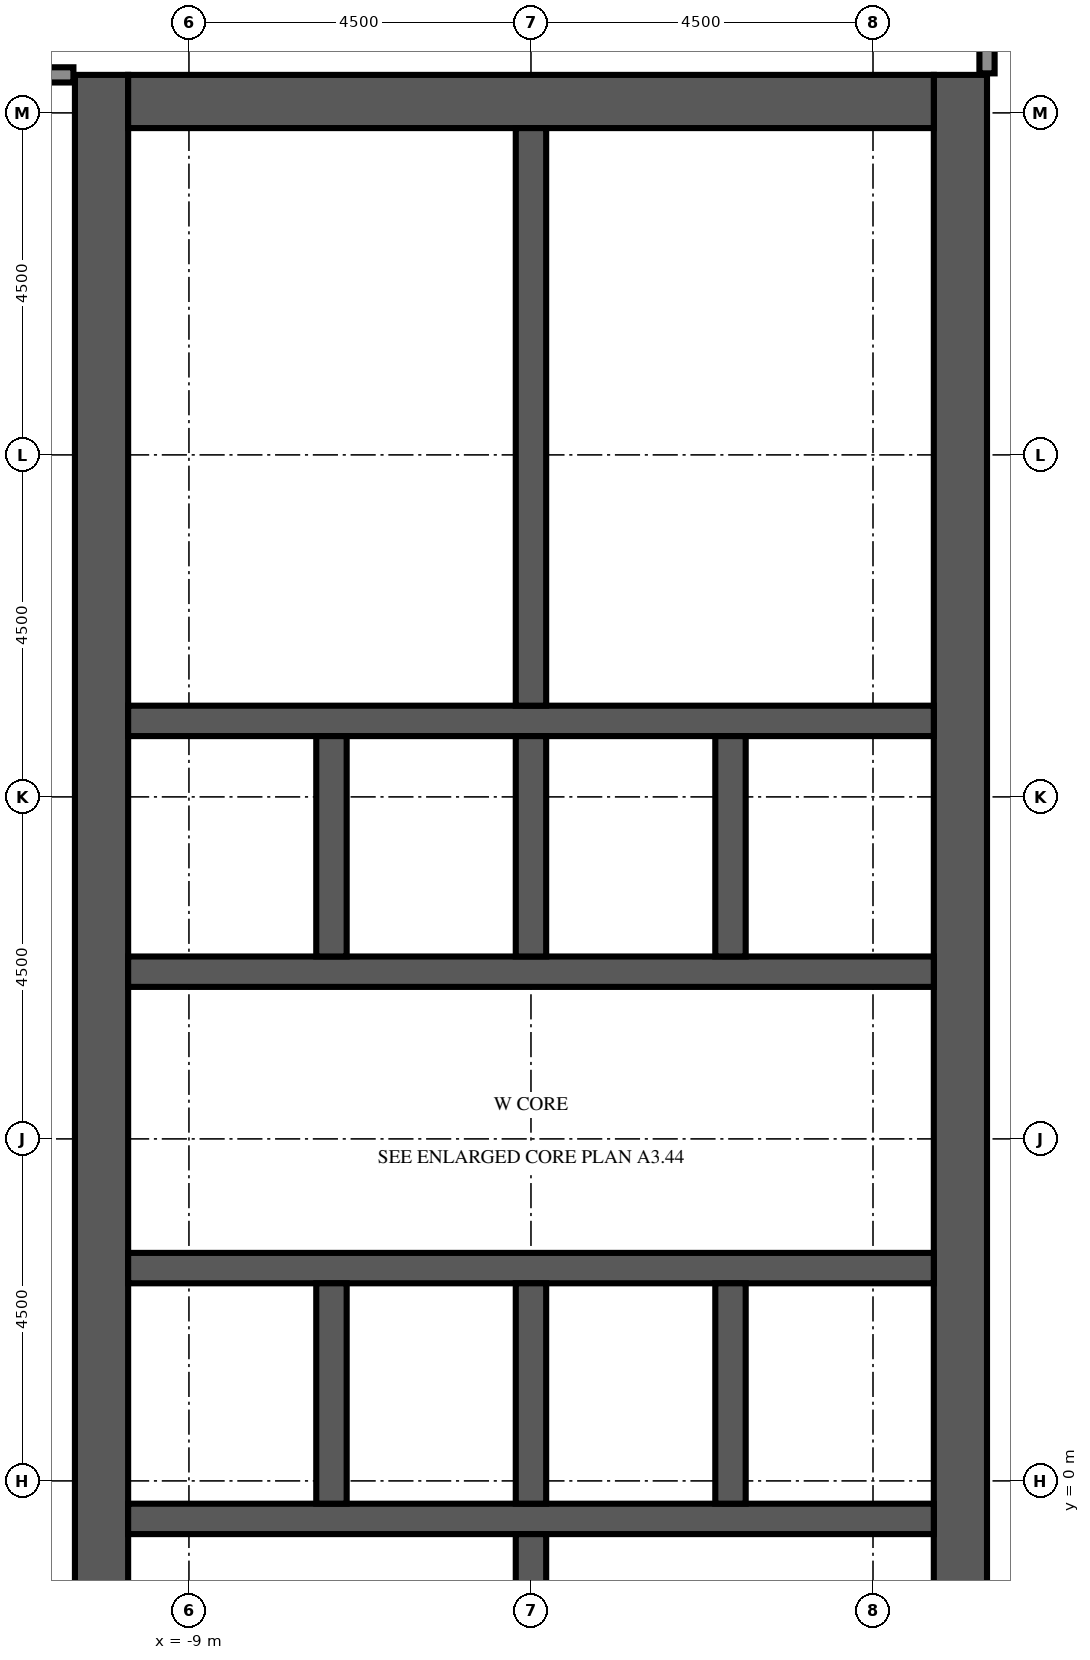
"""IFC4 building model, lengths in metres.
Left out: names, types, materials, properties, quantities, classifications, styles, units other than length and angle.
Written with IfcOpenShell. Run it as: python <this file> out.ifc"""

import sys

from ifc_helpers import new_model, si_unit, direction, frame, frame_2d, origin, place, context, subcontext, project, spatial, rectangle, extrude, element, fill, save


model = new_model("IFC4")
c1 = context("Model", 3, precision=1e-05, world=origin(), true_north=direction((0.0, 1.0)))
c2 = subcontext(c1, "Body", "Model", "MODEL_VIEW")
j1 = project(units=[si_unit("LENGTHUNIT", "METRE"), si_unit("PLANEANGLEUNIT", "RADIAN")], contexts=[c1])
p1 = place(None, origin())
s1 = spatial("IfcSite", under=j1, at=p1, CompositionType="ELEMENT")
p2 = place(p1, origin())
s2 = spatial("IfcBuilding", under=s1, at=p2, CompositionType="ELEMENT")
p3 = place(p2, frame((0.0, 0.0, 306.4)))
s3 = spatial("IfcBuildingStorey", under=s2, at=p3, CompositionType="ELEMENT", Elevation=306.4)
p4 = place(p3, frame((-10.15, -9.0, 0.0), z_axis=(0.0, 0.0, 1.0), x_axis=(0.0, 1.0, 0.0)))
e1 = element("IfcWall", 1, at=p4, inside=s3, PredefinedType="SHEAR", context=c2, shape_type="SweptSolid", body=[
    extrude(rectangle(XDim=27.5, YDim=0.7, at=frame_2d((13.75, 0.0))), origin(), (0.0, 0.0, 1.0), 5.4),
])
p5 = place(p4, frame((12.55, 0.0, 0.0)))
e2 = element("IfcOpeningElement", 2, at=p5, cuts=e1, PredefinedType="OPENING", context=c2, shape_type="SweptSolid", body=[
    extrude(rectangle(XDim=2.4, YDim=2.4, at=frame_2d((1.2, 1.2))), frame((0.0, 0.36, 0.0), z_axis=(0.0, -1.0, 0.0), x_axis=(1.0, 0.0, 0.0)), (0.0, 0.0, 1.0), 0.72),
])
p6 = place(p4, frame((6.825, 0.0, 0.0)))
e3 = element("IfcOpeningElement", 3, at=p6, cuts=e1, PredefinedType="OPENING", context=c2, shape_type="SweptSolid", body=[
    extrude(rectangle(XDim=1.2, YDim=2.1, at=frame_2d((0.6, 1.05))), frame((0.0, 0.36, 0.0), z_axis=(0.0, -1.0, 0.0), x_axis=(1.0, 0.0, 0.0)), (0.0, 0.0, 1.0), 0.72),
])
p7 = place(p4, frame((19.475, 0.0, 0.0)))
e4 = element("IfcOpeningElement", 4, at=p7, cuts=e1, PredefinedType="OPENING", context=c2, shape_type="SweptSolid", body=[
    extrude(rectangle(XDim=1.2, YDim=2.1, at=frame_2d((0.6, 1.05))), frame((0.0, 0.36, 0.0), z_axis=(0.0, -1.0, 0.0), x_axis=(1.0, 0.0, 0.0)), (0.0, 0.0, 1.0), 0.72),
])
p8 = place(p3, frame((1.15, -9.0, 0.0), z_axis=(0.0, 0.0, 1.0), x_axis=(0.0, 1.0, 0.0)))
e5 = element("IfcWall", 5, at=p8, inside=s3, PredefinedType="SHEAR", context=c2, shape_type="SweptSolid", body=[
    extrude(rectangle(XDim=27.5, YDim=0.7, at=frame_2d((13.75, 0.0))), origin(), (0.0, 0.0, 1.0), 5.4),
])
p9 = place(p8, frame((12.55, 0.0, 0.0)))
e6 = element("IfcOpeningElement", 6, at=p9, cuts=e5, PredefinedType="OPENING", context=c2, shape_type="SweptSolid", body=[
    extrude(rectangle(XDim=2.4, YDim=2.4, at=frame_2d((1.2, 1.2))), frame((0.0, 0.36, 0.0), z_axis=(0.0, -1.0, 0.0), x_axis=(1.0, 0.0, 0.0)), (0.0, 0.0, 1.0), 0.72),
])
p10 = place(p8, frame((5.46, 0.0, 0.0)))
e7 = element("IfcOpeningElement", 7, at=p10, cuts=e5, PredefinedType="OPENING", context=c2, shape_type="SweptSolid", body=[
    extrude(rectangle(XDim=0.968, YDim=2.1, at=frame_2d((0.484, 1.05))), frame((0.0, 0.36, 0.0), z_axis=(0.0, -1.0, 0.0), x_axis=(1.0, 0.0, 0.0)), (0.0, 0.0, 1.0), 0.72),
])
p11 = place(p8, frame((23.54, 0.0, 0.0)))
e8 = element("IfcOpeningElement", 8, at=p11, cuts=e5, PredefinedType="OPENING", context=c2, shape_type="SweptSolid", body=[
    extrude(rectangle(XDim=1.2, YDim=2.1, at=frame_2d((0.6, 1.05))), frame((0.0, 0.36, 0.0), z_axis=(0.0, -1.0, 0.0), x_axis=(1.0, 0.0, 0.0)), (0.0, 0.0, 1.0), 0.72),
])
p12 = place(p3, frame((-9.8, 18.15, 0.0), z_axis=(0.0, 0.0, 1.0), x_axis=(1.0, 0.0, 0.0)))
e9 = element("IfcWall", 9, at=p12, inside=s3, PredefinedType="SHEAR", context=c2, shape_type="SweptSolid", body=[
    extrude(rectangle(XDim=10.6, YDim=0.7, at=frame_2d((5.3, 0.0))), origin(), (0.0, 0.0, 1.0), 5.4),
])
p13 = place(p3, frame((-9.8, -0.5, 0.0), z_axis=(0.0, 0.0, 1.0), x_axis=(1.0, 0.0, 0.0)))
e10 = element("IfcWall", 10, at=p13, inside=s3, PredefinedType="SHEAR", context=c2, shape_type="SweptSolid", body=[
    extrude(rectangle(XDim=10.6, YDim=0.4, at=frame_2d((5.3, 0.0))), origin(), (0.0, 0.0, 1.0), 5.4),
])
p14 = place(p3, frame((-9.8, 2.8, 0.0), z_axis=(0.0, 0.0, 1.0), x_axis=(1.0, 0.0, 0.0)))
e11 = element("IfcWall", 11, at=p14, inside=s3, PredefinedType="SHEAR", context=c2, shape_type="SweptSolid", body=[
    extrude(rectangle(XDim=10.6, YDim=0.4, at=frame_2d((5.3, 0.0))), origin(), (0.0, 0.0, 1.0), 5.4),
])
p15 = place(p14, frame((0.688, 0.0, 0.0)))
e12 = element("IfcOpeningElement", 12, at=p15, cuts=e11, PredefinedType="OPENING", context=c2, shape_type="SweptSolid", body=[
    extrude(rectangle(XDim=1.1, YDim=2.1, at=frame_2d((0.55, 1.05))), frame((0.0, 0.21, 0.0), z_axis=(0.0, -1.0, 0.0), x_axis=(1.0, 0.0, 0.0)), (0.0, 0.0, 1.0), 0.42),
])
p16 = place(p14, frame((3.438, 0.0, 0.0)))
e13 = element("IfcOpeningElement", 13, at=p16, cuts=e11, PredefinedType="OPENING", context=c2, shape_type="SweptSolid", body=[
    extrude(rectangle(XDim=1.1, YDim=2.1, at=frame_2d((0.55, 1.05))), frame((0.0, 0.21, 0.0), z_axis=(0.0, -1.0, 0.0), x_axis=(1.0, 0.0, 0.0)), (0.0, 0.0, 1.0), 0.42),
])
p17 = place(p14, frame((6.113, 0.0, 0.0)))
e14 = element("IfcOpeningElement", 14, at=p17, cuts=e11, PredefinedType="OPENING", context=c2, shape_type="SweptSolid", body=[
    extrude(rectangle(XDim=1.0, YDim=2.1, at=frame_2d((0.5, 1.05))), frame((0.0, 0.21, 0.0), z_axis=(0.0, -1.0, 0.0), x_axis=(1.0, 0.0, 0.0)), (0.0, 0.0, 1.0), 0.42),
])
p18 = place(p14, frame((8.863, 0.0, 0.0)))
e15 = element("IfcOpeningElement", 15, at=p18, cuts=e11, PredefinedType="OPENING", context=c2, shape_type="SweptSolid", body=[
    extrude(rectangle(XDim=1.0, YDim=2.1, at=frame_2d((0.5, 1.05))), frame((0.0, 0.21, 0.0), z_axis=(0.0, -1.0, 0.0), x_axis=(1.0, 0.0, 0.0)), (0.0, 0.0, 1.0), 0.42),
])
p19 = place(p3, frame((-9.8, 6.7, 0.0), z_axis=(0.0, 0.0, 1.0), x_axis=(1.0, 0.0, 0.0)))
e16 = element("IfcWall", 16, at=p19, inside=s3, PredefinedType="SHEAR", context=c2, shape_type="SweptSolid", body=[
    extrude(rectangle(XDim=10.6, YDim=0.4, at=frame_2d((5.3, 0.0))), origin(), (0.0, 0.0, 1.0), 5.4),
])
p20 = place(p19, frame((0.738, 0.0, 0.0)))
e17 = element("IfcOpeningElement", 17, at=p20, cuts=e16, PredefinedType="OPENING", context=c2, shape_type="SweptSolid", body=[
    extrude(rectangle(XDim=1.0, YDim=2.1, at=frame_2d((0.5, 1.05))), frame((0.0, 0.21, 0.0), z_axis=(0.0, -1.0, 0.0), x_axis=(1.0, 0.0, 0.0)), (0.0, 0.0, 1.0), 0.42),
])
p21 = place(p19, frame((3.488, 0.0, 0.0)))
e18 = element("IfcOpeningElement", 18, at=p21, cuts=e16, PredefinedType="OPENING", context=c2, shape_type="SweptSolid", body=[
    extrude(rectangle(XDim=1.0, YDim=2.1, at=frame_2d((0.5, 1.05))), frame((0.0, 0.21, 0.0), z_axis=(0.0, -1.0, 0.0), x_axis=(1.0, 0.0, 0.0)), (0.0, 0.0, 1.0), 0.42),
])
p22 = place(p19, frame((6.113, 0.0, 0.0)))
e19 = element("IfcOpeningElement", 19, at=p22, cuts=e16, PredefinedType="OPENING", context=c2, shape_type="SweptSolid", body=[
    extrude(rectangle(XDim=1.0, YDim=2.1, at=frame_2d((0.5, 1.05))), frame((0.0, 0.21, 0.0), z_axis=(0.0, -1.0, 0.0), x_axis=(1.0, 0.0, 0.0)), (0.0, 0.0, 1.0), 0.42),
])
p23 = place(p19, frame((8.863, 0.0, 0.0)))
e20 = element("IfcOpeningElement", 20, at=p23, cuts=e16, PredefinedType="OPENING", context=c2, shape_type="SweptSolid", body=[
    extrude(rectangle(XDim=1.0, YDim=2.1, at=frame_2d((0.5, 1.05))), frame((0.0, 0.21, 0.0), z_axis=(0.0, -1.0, 0.0), x_axis=(1.0, 0.0, 0.0)), (0.0, 0.0, 1.0), 0.42),
])
p24 = place(p3, frame((-9.8, 10.0, 0.0), z_axis=(0.0, 0.0, 1.0), x_axis=(1.0, 0.0, 0.0)))
e21 = element("IfcWall", 21, at=p24, inside=s3, PredefinedType="SHEAR", context=c2, shape_type="SweptSolid", body=[
    extrude(rectangle(XDim=10.6, YDim=0.4, at=frame_2d((5.3, 0.0))), origin(), (0.0, 0.0, 1.0), 5.4),
])
for number, where, z_axis, x_axis in (
    (22, (-7.125, -0.3, 0.0), (0.0, 0.0, 1.0), (0.0, 1.0, 0.0)),
    (23, (-7.125, 6.9, 0.0), (0.0, 0.0, 1.0), (0.0, 1.0, 0.0)),
    (24, (-4.5, -0.3, 0.0), (0.0, 0.0, 1.0), (0.0, 1.0, 0.0)),
    (25, (-4.5, 6.9, 0.0), (0.0, 0.0, 1.0), (0.0, 1.0, 0.0)),
    (26, (-1.875, -0.3, 0.0), (0.0, 0.0, 1.0), (0.0, 1.0, 0.0)),
    (27, (-1.875, 6.9, 0.0), (0.0, 0.0, 1.0), (0.0, 1.0, 0.0)),
):
    element("IfcWall", number, at=place(p3, frame(where, z_axis=z_axis, x_axis=x_axis)), inside=s3, PredefinedType="SHEAR", context=c2, shape_type="SweptSolid", body=[
        extrude(rectangle(XDim=2.9, YDim=0.4, at=frame_2d((1.45, 0.0))), origin(), (0.0, 0.0, 1.0), 5.4),
    ])
for number, where, z_axis, x_axis in (
    (28, (-4.5, -8.3, 0.0), (0.0, 0.0, 1.0), (0.0, 1.0, 0.0)),
    (29, (-4.5, 10.2, 0.0), (0.0, 0.0, 1.0), (0.0, 1.0, 0.0)),
):
    element("IfcWall", number, at=place(p3, frame(where, z_axis=z_axis, x_axis=x_axis)), inside=s3, PredefinedType="SHEAR", context=c2, shape_type="SweptSolid", body=[
        extrude(rectangle(XDim=7.6, YDim=0.4, at=frame_2d((3.8, 0.0))), origin(), (0.0, 0.0, 1.0), 5.4),
    ])
p25 = place(p3, frame((-13.0, 18.5, 0.0), z_axis=(0.0, 0.0, 1.0), x_axis=(1.0, 0.0, 0.0)))
e30 = element("IfcWall", 30, at=p25, inside=s3, PredefinedType="PARTITIONING", context=c2, shape_type="SweptSolid", body=[
    extrude(rectangle(XDim=2.48, YDim=0.2, at=frame_2d((1.24, 0.0))), origin(), (0.0, 0.0, 1.0), 4.8),
])
p26 = place(p3, frame((1.5, 18.52, 0.0), z_axis=(0.0, 0.0, 1.0), x_axis=(0.0, 1.0, 0.0)))
e31 = element("IfcWall", 31, at=p26, inside=s3, PredefinedType="PARTITIONING", context=c2, shape_type="SweptSolid", body=[
    extrude(rectangle(XDim=3.835, YDim=0.2, at=frame_2d((1.917, 0.0))), origin(), (0.0, 0.0, 1.0), 4.8),
])
p27 = place(p26, frame((1.58, 0.0, 0.0)))
e32 = element("IfcOpeningElement", 32, at=p27, cuts=e31, PredefinedType="OPENING", context=c2, shape_type="SweptSolid", body=[
    extrude(rectangle(XDim=1.0, YDim=2.1, at=frame_2d((0.5, 1.05))), frame((0.0, 0.11, 0.0), z_axis=(0.0, -1.0, 0.0), x_axis=(1.0, 0.0, 0.0)), (0.0, 0.0, 1.0), 0.22),
])
p28 = place(p3, frame((-1.75, -2.372, 0.0), z_axis=(0.0, 0.0, 1.0), x_axis=(0.0, 1.0, 0.0)))
e33 = element("IfcWall", 33, at=p28, inside=s3, PredefinedType="PARTITIONING", context=c2, shape_type="SweptSolid", body=[
    extrude(rectangle(XDim=1.672, YDim=0.1, at=frame_2d((0.836, 0.0))), origin(), (0.0, 0.0, 1.0), 4.8),
])
p29 = place(p3, frame((-0.5, 12.48, 0.0), z_axis=(0.0, 0.0, 1.0), x_axis=(1.0, 0.0, 0.0)))
e34 = element("IfcWall", 34, at=p29, inside=s3, PredefinedType="PARTITIONING", context=c2, shape_type="SweptSolid", body=[
    extrude(rectangle(XDim=1.3, YDim=0.1, at=frame_2d((0.65, 0.0))), origin(), (0.0, 0.0, 1.0), 4.8),
])
p30 = place(p29, frame((0.2, 0.0, 0.0)))
e35 = element("IfcOpeningElement", 35, at=p30, cuts=e34, PredefinedType="OPENING", context=c2, shape_type="SweptSolid", body=[
    extrude(rectangle(XDim=0.9, YDim=2.1, at=frame_2d((0.45, 1.05))), frame((0.0, 0.06, 0.0), z_axis=(0.0, -1.0, 0.0), x_axis=(1.0, 0.0, 0.0)), (0.0, 0.0, 1.0), 0.12),
])
p31 = place(p3, frame((-4.3, 12.48, 0.0), z_axis=(0.0, 0.0, 1.0), x_axis=(1.0, 0.0, 0.0)))
e36 = element("IfcWall", 36, at=p31, inside=s3, PredefinedType="PARTITIONING", context=c2, shape_type="SweptSolid", body=[
    extrude(rectangle(XDim=3.8, YDim=0.1, at=frame_2d((1.9, 0.0))), origin(), (0.0, 0.0, 1.0), 4.8),
])
p32 = place(p3, frame((-0.5, 12.48, 0.0), z_axis=(0.0, 0.0, 1.0), x_axis=(0.0, 1.0, 0.0)))
e37 = element("IfcWall", 37, at=p32, inside=s3, PredefinedType="PARTITIONING", context=c2, shape_type="SweptSolid", body=[
    extrude(rectangle(XDim=2.66, YDim=0.1, at=frame_2d((1.33, 0.0))), origin(), (0.0, 0.0, 1.0), 4.8),
])
p33 = place(p32, frame((0.83, 0.0, 0.0)))
e38 = element("IfcOpeningElement", 38, at=p33, cuts=e37, PredefinedType="OPENING", context=c2, shape_type="SweptSolid", body=[
    extrude(rectangle(XDim=1.0, YDim=2.1, at=frame_2d((0.5, 1.05))), frame((0.0, 0.06, 0.0), z_axis=(0.0, -1.0, 0.0), x_axis=(1.0, 0.0, 0.0)), (0.0, 0.0, 1.0), 0.12),
])
p34 = place(p3, frame((-0.5, 15.14, 0.0), z_axis=(0.0, 0.0, 1.0), x_axis=(0.0, 1.0, 0.0)))
e39 = element("IfcWall", 39, at=p34, inside=s3, PredefinedType="PARTITIONING", context=c2, shape_type="SweptSolid", body=[
    extrude(rectangle(XDim=2.66, YDim=0.1, at=frame_2d((1.33, 0.0))), origin(), (0.0, 0.0, 1.0), 4.8),
])
p35 = place(p34, frame((0.83, 0.0, 0.0)))
e40 = element("IfcOpeningElement", 40, at=p35, cuts=e39, PredefinedType="OPENING", context=c2, shape_type="SweptSolid", body=[
    extrude(rectangle(XDim=1.0, YDim=2.1, at=frame_2d((0.5, 1.05))), frame((0.0, 0.06, 0.0), z_axis=(0.0, -1.0, 0.0), x_axis=(1.0, 0.0, 0.0)), (0.0, 0.0, 1.0), 0.12),
])
p36 = place(p3, frame((-4.3, 15.14, 0.0), z_axis=(0.0, 0.0, 1.0), x_axis=(1.0, 0.0, 0.0)))
e41 = element("IfcWall", 41, at=p36, inside=s3, PredefinedType="PARTITIONING", context=c2, shape_type="SweptSolid", body=[
    extrude(rectangle(XDim=3.8, YDim=0.1, at=frame_2d((1.9, 0.0))), origin(), (0.0, 0.0, 1.0), 4.8),
])
p37 = place(p15, origin())
e42 = element("IfcDoor", 42, at=p37, inside=s3, OperationType="DOUBLE_DOOR_SLIDING", PredefinedType="DOOR", context=c2, shape_type="SweptSolid", body=[
    extrude(rectangle(XDim=1.1, YDim=2.1, at=frame_2d((0.55, 1.05))), frame((0.0, 0.025, 0.0), z_axis=(0.0, -1.0, 0.0), x_axis=(1.0, 0.0, 0.0)), (0.0, 0.0, 1.0), 0.05),
])
fill(e12, e42)
p38 = place(p16, origin())
e43 = element("IfcDoor", 43, at=p38, inside=s3, OperationType="DOUBLE_DOOR_SLIDING", PredefinedType="DOOR", context=c2, shape_type="SweptSolid", body=[
    extrude(rectangle(XDim=1.1, YDim=2.1, at=frame_2d((0.55, 1.05))), frame((0.0, 0.025, 0.0), z_axis=(0.0, -1.0, 0.0), x_axis=(1.0, 0.0, 0.0)), (0.0, 0.0, 1.0), 0.05),
])
fill(e13, e43)
p39 = place(p5, origin())
e44 = element("IfcDoor", 44, at=p39, inside=s3, OperationType="DOUBLE_DOOR_DOUBLE_SWING", PredefinedType="DOOR", context=c2, shape_type="SweptSolid", body=[
    extrude(rectangle(XDim=2.4, YDim=2.4, at=frame_2d((1.2, 1.2))), frame((0.0, 0.025, 0.0), z_axis=(0.0, -1.0, 0.0), x_axis=(1.0, 0.0, 0.0)), (0.0, 0.0, 1.0), 0.05),
])
fill(e2, e44)
p40 = place(p9, origin())
e45 = element("IfcDoor", 45, at=p40, inside=s3, OperationType="DOUBLE_DOOR_DOUBLE_SWING", PredefinedType="DOOR", context=c2, shape_type="SweptSolid", body=[
    extrude(rectangle(XDim=2.4, YDim=2.4, at=frame_2d((1.2, 1.2))), frame((0.0, 0.025, 0.0), z_axis=(0.0, -1.0, 0.0), x_axis=(1.0, 0.0, 0.0)), (0.0, 0.0, 1.0), 0.05),
])
fill(e6, e45)
p41 = place(p6, origin())
e46 = element("IfcDoor", 46, at=p41, inside=s3, OperationType="SINGLE_SWING_LEFT", PredefinedType="DOOR", context=c2, shape_type="SweptSolid", body=[
    extrude(rectangle(XDim=1.2, YDim=2.1, at=frame_2d((0.6, 1.05))), frame((0.0, 0.025, 0.0), z_axis=(0.0, -1.0, 0.0), x_axis=(1.0, 0.0, 0.0)), (0.0, 0.0, 1.0), 0.05),
])
fill(e3, e46)
p42 = place(p7, origin())
e47 = element("IfcDoor", 47, at=p42, inside=s3, OperationType="SINGLE_SWING_LEFT", PredefinedType="DOOR", context=c2, shape_type="SweptSolid", body=[
    extrude(rectangle(XDim=1.2, YDim=2.1, at=frame_2d((0.6, 1.05))), frame((0.0, 0.025, 0.0), z_axis=(0.0, -1.0, 0.0), x_axis=(1.0, 0.0, 0.0)), (0.0, 0.0, 1.0), 0.05),
])
fill(e4, e47)
p43 = place(p17, origin())
e48 = element("IfcDoor", 48, at=p43, inside=s3, OperationType="SINGLE_SWING_LEFT", PredefinedType="DOOR", context=c2, shape_type="SweptSolid", body=[
    extrude(rectangle(XDim=1.0, YDim=2.1, at=frame_2d((0.5, 1.05))), frame((0.0, 0.025, 0.0), z_axis=(0.0, -1.0, 0.0), x_axis=(1.0, 0.0, 0.0)), (0.0, 0.0, 1.0), 0.05),
])
fill(e14, e48)
p44 = place(p18, origin())
e49 = element("IfcDoor", 49, at=p44, inside=s3, OperationType="SINGLE_SWING_RIGHT", PredefinedType="DOOR", context=c2, shape_type="SweptSolid", body=[
    extrude(rectangle(XDim=1.0, YDim=2.1, at=frame_2d((0.5, 1.05))), frame((0.0, 0.025, 0.0), z_axis=(0.0, -1.0, 0.0), x_axis=(1.0, 0.0, 0.0)), (0.0, 0.0, 1.0), 0.05),
])
fill(e15, e49)
p45 = place(p20, origin())
e50 = element("IfcDoor", 50, at=p45, inside=s3, OperationType="SINGLE_SWING_LEFT", PredefinedType="DOOR", context=c2, shape_type="SweptSolid", body=[
    extrude(rectangle(XDim=1.0, YDim=2.1, at=frame_2d((0.5, 1.05))), frame((0.0, 0.025, 0.0), z_axis=(0.0, -1.0, 0.0), x_axis=(1.0, 0.0, 0.0)), (0.0, 0.0, 1.0), 0.05),
])
fill(e17, e50)
p46 = place(p21, origin())
e51 = element("IfcDoor", 51, at=p46, inside=s3, OperationType="SINGLE_SWING_RIGHT", PredefinedType="DOOR", context=c2, shape_type="SweptSolid", body=[
    extrude(rectangle(XDim=1.0, YDim=2.1, at=frame_2d((0.5, 1.05))), frame((0.0, 0.025, 0.0), z_axis=(0.0, -1.0, 0.0), x_axis=(1.0, 0.0, 0.0)), (0.0, 0.0, 1.0), 0.05),
])
fill(e18, e51)
p47 = place(p22, origin())
e52 = element("IfcDoor", 52, at=p47, inside=s3, OperationType="SINGLE_SWING_LEFT", PredefinedType="DOOR", context=c2, shape_type="SweptSolid", body=[
    extrude(rectangle(XDim=1.0, YDim=2.1, at=frame_2d((0.5, 1.05))), frame((0.0, 0.025, 0.0), z_axis=(0.0, -1.0, 0.0), x_axis=(1.0, 0.0, 0.0)), (0.0, 0.0, 1.0), 0.05),
])
fill(e19, e52)
p48 = place(p23, origin())
e53 = element("IfcDoor", 53, at=p48, inside=s3, OperationType="SINGLE_SWING_RIGHT", PredefinedType="DOOR", context=c2, shape_type="SweptSolid", body=[
    extrude(rectangle(XDim=1.0, YDim=2.1, at=frame_2d((0.5, 1.05))), frame((0.0, 0.025, 0.0), z_axis=(0.0, -1.0, 0.0), x_axis=(1.0, 0.0, 0.0)), (0.0, 0.0, 1.0), 0.05),
])
fill(e20, e53)
p49 = place(p30, origin())
e54 = element("IfcDoor", 54, at=p49, inside=s3, OperationType="SINGLE_SWING_LEFT", PredefinedType="DOOR", context=c2, shape_type="SweptSolid", body=[
    extrude(rectangle(XDim=0.9, YDim=2.1, at=frame_2d((0.45, 1.05))), frame((0.0, 0.025, 0.0), z_axis=(0.0, -1.0, 0.0), x_axis=(1.0, 0.0, 0.0)), (0.0, 0.0, 1.0), 0.05),
])
fill(e35, e54)
p50 = place(p11, origin())
e55 = element("IfcDoor", 55, at=p50, inside=s3, OperationType="SINGLE_SWING_RIGHT", PredefinedType="DOOR", context=c2, shape_type="SweptSolid", body=[
    extrude(rectangle(XDim=1.2, YDim=2.1, at=frame_2d((0.6, 1.05))), frame((0.0, 0.325, 0.0), z_axis=(0.0, -1.0, 0.0), x_axis=(1.0, 0.0, 0.0)), (0.0, 0.0, 1.0), 0.05),
])
fill(e8, e55)
p51 = place(p33, origin())
e56 = element("IfcDoor", 56, at=p51, inside=s3, OperationType="SINGLE_SWING_LEFT", PredefinedType="DOOR", context=c2, shape_type="SweptSolid", body=[
    extrude(rectangle(XDim=1.0, YDim=2.1, at=frame_2d((0.5, 1.05))), frame((0.0, 0.025, 0.0), z_axis=(0.0, -1.0, 0.0), x_axis=(1.0, 0.0, 0.0)), (0.0, 0.0, 1.0), 0.05),
])
fill(e38, e56)
p52 = place(p35, origin())
e57 = element("IfcDoor", 57, at=p52, inside=s3, OperationType="SINGLE_SWING_RIGHT", PredefinedType="DOOR", context=c2, shape_type="SweptSolid", body=[
    extrude(rectangle(XDim=1.0, YDim=2.1, at=frame_2d((0.5, 1.05))), frame((0.0, 0.025, 0.0), z_axis=(0.0, -1.0, 0.0), x_axis=(1.0, 0.0, 0.0)), (0.0, 0.0, 1.0), 0.05),
])
fill(e40, e57)
save(model, sys.argv[1])
